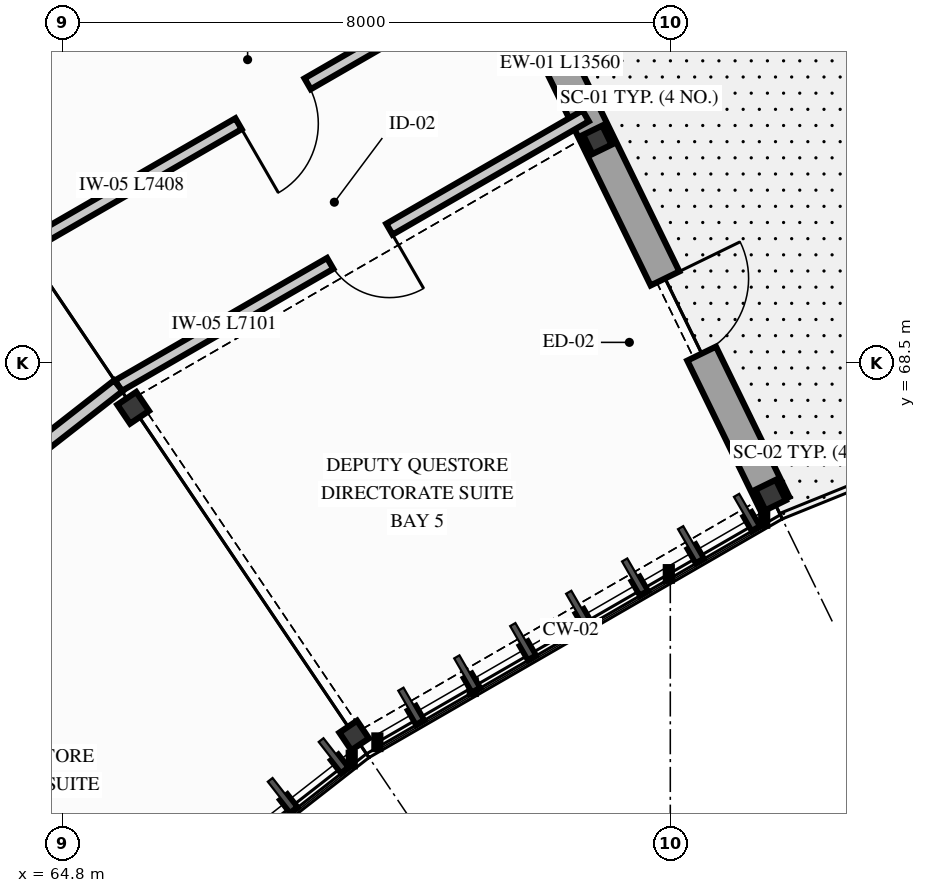
"""IFC4 building model, lengths in metres.
Left out: names, types, materials, properties, quantities, classifications, styles, units other than length and angle.
Written with IfcOpenShell. Run it as: python <this file> out.ifc"""

import sys

from ifc_helpers import new_model, si_unit, direction, frame, frame_2d, origin, origin_2d, place, context, subcontext, project, spatial, rectangle, i_section, extrude, element, fill, save


model = new_model("IFC4")
c1 = context("Model", 3, precision=1e-05, world=origin(), true_north=direction((0.0, 1.0)))
c2 = subcontext(c1, "Body", "Model", "MODEL_VIEW")
j1 = project(units=[si_unit("LENGTHUNIT", "METRE"), si_unit("PLANEANGLEUNIT", "RADIAN")], contexts=[c1])
p1 = place(None, origin())
s1 = spatial("IfcSite", under=j1, at=p1, CompositionType="ELEMENT")
p2 = place(p1, origin())
s2 = spatial("IfcBuilding", under=s1, at=p2, CompositionType="ELEMENT")
p3 = place(p2, frame((0.0, 0.0, 25.5)))
s3 = spatial("IfcBuildingStorey", under=s2, at=p3, CompositionType="ELEMENT", Elevation=25.5)
p4 = place(p3, frame((74.12, 66.76, 0.0), z_axis=(0.0, 0.0, 1.0), x_axis=(0.898794046299, 0.438371146789, 0.0)))
e1 = element("IfcColumn", 1, at=p4, inside=s3, PredefinedType="COLUMN", context=c2, shape_type="SweptSolid", body=[
    extrude(i_section(OverallWidth=0.3, OverallDepth=0.3, WebThickness=0.011, FlangeThickness=0.019, FilletRadius=0.027, at=origin_2d()), origin(), (0.0, 0.0, 1.0), 3.705),
])
p5 = place(p3, frame((71.84, 71.434, 0.0), z_axis=(0.0, 0.0, 1.0), x_axis=(0.898794046299, 0.438371146789, 0.0)))
e2 = element("IfcColumn", 2, at=p5, inside=s3, PredefinedType="COLUMN", context=c2, shape_type="SweptSolid", body=[
    extrude(i_section(OverallWidth=0.28, OverallDepth=0.28, WebThickness=0.01, FlangeThickness=0.018, FilletRadius=0.024, at=origin_2d()), origin(), (0.0, 0.0, 1.0), 4.522),
])
p6 = place(p3, frame((68.641, 63.597, 0.0), z_axis=(0.0, 0.0, 1.0), x_axis=(0.829037572555, 0.559192903471, 0.0)))
e3 = element("IfcColumn", 3, at=p6, inside=s3, PredefinedType="COLUMN", context=c2, shape_type="SweptSolid", body=[
    extrude(i_section(OverallWidth=0.28, OverallDepth=0.28, WebThickness=0.01, FlangeThickness=0.018, FilletRadius=0.024, at=origin_2d()), origin(), (0.0, 0.0, 1.0), 4.005),
])
p7 = place(p3, frame((65.733, 67.908, 0.0), z_axis=(0.0, 0.0, 1.0), x_axis=(0.829037572555, 0.559192903471, 0.0)))
e4 = element("IfcColumn", 4, at=p7, inside=s3, PredefinedType="COLUMN", context=c2, shape_type="SweptSolid", body=[
    extrude(i_section(OverallWidth=0.3, OverallDepth=0.3, WebThickness=0.011, FlangeThickness=0.019, FilletRadius=0.027, at=origin_2d()), origin(), (0.0, 0.0, 1.0), 4.822),
])
p8 = place(p3, frame((74.177, 66.644, 0.0), z_axis=(0.0, 0.0, 1.0), x_axis=(-0.438391351702, 0.898784191423, 0.0)))
e5 = element("IfcWall", 5, at=p8, inside=s3, PredefinedType="SOLIDWALL", context=c2, shape_type="SweptSolid", body=[
    extrude(rectangle(XDim=13.56, YDim=0.42, at=frame_2d((6.78, 0.0))), origin(), (0.0, 0.0, 1.0), 3.65),
])
p9 = place(p8, frame((3.3, 0.0, 0.0), z_axis=(0.0, 0.0, 1.0), x_axis=(-1.0, 0.0, 0.0)))
e6 = element("IfcOpeningElement", 6, at=p9, cuts=e5, PredefinedType="OPENING", context=c2, shape_type="SweptSolid", body=[
    extrude(rectangle(XDim=1.1, YDim=2.25, at=frame_2d((0.55, 1.125))), frame((0.0, 0.22, 0.0), z_axis=(0.0, -1.0, 0.0), x_axis=(1.0, 0.0, 0.0)), (0.0, 0.0, 1.0), 0.44),
])
p10 = place(p8, frame((10.7, 0.0, 0.0), z_axis=(0.0, 0.0, 1.0), x_axis=(-1.0, 0.0, 0.0)))
e7 = element("IfcOpeningElement", 7, at=p10, cuts=e5, PredefinedType="OPENING", context=c2, shape_type="SweptSolid", body=[
    extrude(rectangle(XDim=1.1, YDim=2.25, at=frame_2d((0.55, 1.125))), frame((0.0, 0.22, 0.0), z_axis=(0.0, -1.0, 0.0), x_axis=(1.0, 0.0, 0.0)), (0.0, 0.0, 1.0), 0.44),
])
p11 = place(p3, frame((71.687, 71.749, 0.0), z_axis=(0.0, 0.0, 1.0), x_axis=(-0.866032151687, -0.499988312107, 0.0)))
e8 = element("IfcWall", 8, at=p11, inside=s3, PredefinedType="PARTITIONING", context=c2, shape_type="SweptSolid", body=[
    extrude(rectangle(XDim=7.101, YDim=0.165, at=frame_2d((3.551, 0.0))), origin(), (0.0, 0.0, 1.0), 3.68),
])
p12 = place(p11, frame((2.982, 0.0, 0.0)))
e9 = element("IfcOpeningElement", 9, at=p12, cuts=e8, PredefinedType="OPENING", context=c2, shape_type="SweptSolid", body=[
    extrude(rectangle(XDim=0.9, YDim=2.1, at=frame_2d((0.45, 1.05))), frame((0.0, 0.093, 0.0), z_axis=(0.0, -1.0, 0.0), x_axis=(1.0, 0.0, 0.0)), (0.0, 0.0, 1.0), 0.185),
])
p13 = place(p3, frame((70.722, 73.726, 0.0), z_axis=(0.0, 0.0, 1.0), x_axis=(-0.866019843608, -0.500009630384, 0.0)))
e10 = element("IfcWall", 10, at=p13, inside=s3, PredefinedType="PARTITIONING", context=c2, shape_type="SweptSolid", body=[
    extrude(rectangle(XDim=7.408, YDim=0.165, at=frame_2d((3.704, 0.0))), origin(), (0.0, 0.0, 1.0), 3.68),
])
p14 = place(p13, frame((3.111, 0.0, 0.0)))
e11 = element("IfcOpeningElement", 11, at=p14, cuts=e10, PredefinedType="OPENING", context=c2, shape_type="SweptSolid", body=[
    extrude(rectangle(XDim=1.05, YDim=2.2, at=frame_2d((0.525, 1.1))), frame((0.0, 0.093, 0.0), z_axis=(0.0, -1.0, 0.0), x_axis=(1.0, 0.0, 0.0)), (0.0, 0.0, 1.0), 0.185),
])
p15 = place(p3, frame((65.537, 68.198, 0.0), z_axis=(0.0, 0.0, 1.0), x_axis=(-0.788011863809, -0.615660054329, 0.0)))
e12 = element("IfcWall", 12, at=p15, inside=s3, PredefinedType="PARTITIONING", context=c2, shape_type="SweptSolid", body=[
    extrude(rectangle(XDim=7.101, YDim=0.18, at=frame_2d((3.551, 0.0))), origin(), (0.0, 0.0, 1.0), 3.68),
])
p16 = place(p15, frame((2.982, 0.0, 0.0)))
e13 = element("IfcOpeningElement", 13, at=p16, cuts=e12, PredefinedType="OPENING", context=c2, shape_type="SweptSolid", body=[
    extrude(rectangle(XDim=0.92, YDim=2.12, at=frame_2d((0.46, 1.06))), frame((0.0, 0.1, 0.0), z_axis=(0.0, -1.0, 0.0), x_axis=(1.0, 0.0, 0.0)), (0.0, 0.0, 1.0), 0.2),
])
p17 = place(p9, origin())
e14 = element("IfcDoor", 14, at=p17, inside=s3, OperationType="SINGLE_SWING_LEFT", PredefinedType="DOOR", context=c2, shape_type="SweptSolid", body=[
    extrude(rectangle(XDim=1.1, YDim=2.25, at=frame_2d((0.55, 1.125))), frame((0.0, 0.025, 0.0), z_axis=(0.0, -1.0, 0.0), x_axis=(1.0, 0.0, 0.0)), (0.0, 0.0, 1.0), 0.05),
])
fill(e6, e14)
p18 = place(p12, origin())
e15 = element("IfcDoor", 15, at=p18, inside=s3, OperationType="SINGLE_SWING_LEFT", PredefinedType="DOOR", context=c2, shape_type="SweptSolid", body=[
    extrude(rectangle(XDim=0.9, YDim=2.1, at=frame_2d((0.45, 1.05))), frame((0.0, 0.025, 0.0), z_axis=(0.0, -1.0, 0.0), x_axis=(1.0, 0.0, 0.0)), (0.0, 0.0, 1.0), 0.05),
])
fill(e9, e15)
p19 = place(p14, origin())
e16 = element("IfcDoor", 16, at=p19, inside=s3, OperationType="SINGLE_SWING_RIGHT", PredefinedType="DOOR", context=c2, shape_type="SweptSolid", body=[
    extrude(rectangle(XDim=1.05, YDim=2.2, at=frame_2d((0.525, 1.1))), frame((0.0, 0.025, 0.0), z_axis=(0.0, -1.0, 0.0), x_axis=(1.0, 0.0, 0.0)), (0.0, 0.0, 1.0), 0.05),
])
fill(e11, e16)
save(model, sys.argv[1])
